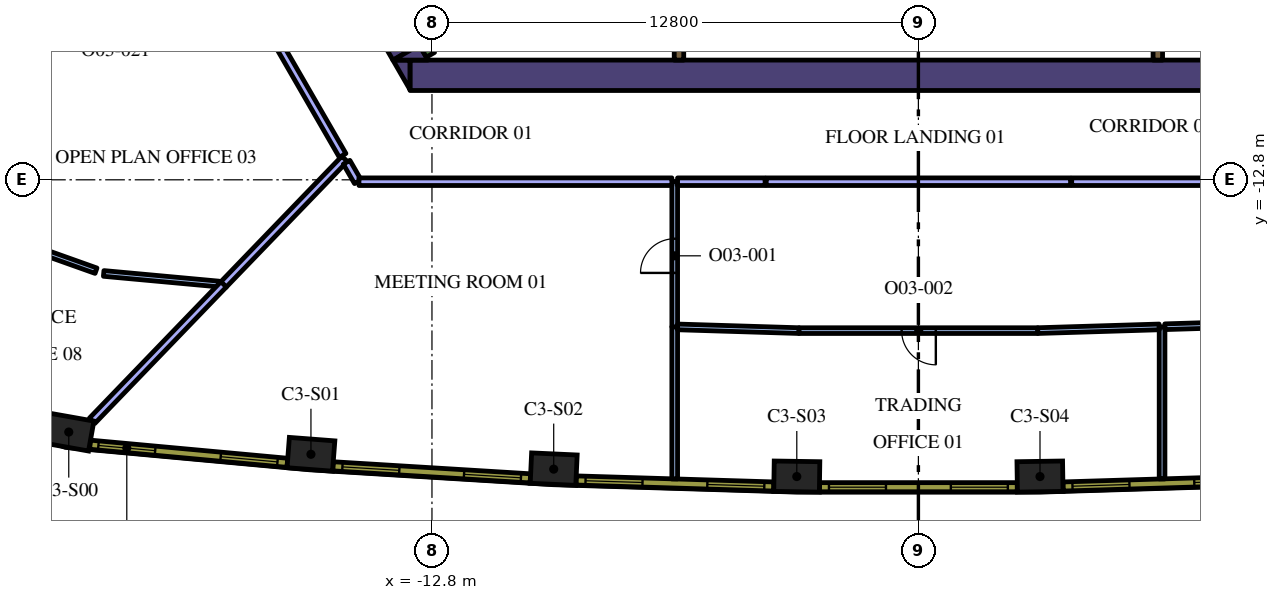
"""IFC4 building model, lengths in metres.
Left out: names, types, materials, properties, quantities, classifications, styles, units other than length and angle.
Written with IfcOpenShell. Run it as: python <this file> out.ifc"""

import sys

from ifc_helpers import new_model, si_unit, direction, frame, frame_2d, origin, origin_2d, place, context, subcontext, project, spatial, polyline, rectangle, outline, extrude, element, fill, save


model = new_model("IFC4")
c1 = context("Model", 3, precision=1e-05, world=origin(), true_north=direction((0.0, 1.0)))
c2 = subcontext(c1, "Body", "Model", "MODEL_VIEW")
j1 = project(units=[si_unit("LENGTHUNIT", "METRE"), si_unit("PLANEANGLEUNIT", "RADIAN")], contexts=[c1])
p1 = place(None, origin())
s1 = spatial("IfcSite", under=j1, at=p1, CompositionType="ELEMENT")
p2 = place(p1, origin())
s2 = spatial("IfcBuilding", under=s1, at=p2, CompositionType="ELEMENT")
p3 = place(p2, frame((0.0, 0.0, 175.2)))
s3 = spatial("IfcBuildingStorey", under=s2, at=p3, CompositionType="ELEMENT", Elevation=175.2)
for number, where, z_axis, x_axis in (
    (1, (-22.357, -19.437, 0.0), (0.0, 0.0, 1.0), (0.985, -0.175, 0.0)),
    (2, (-15.985, -20.022, 0.0), (0.0, 0.0, 1.0), (0.997, -0.076, 0.0)),
    (3, (-9.597, -20.413, 0.0), (0.0, 0.0, 1.0), (0.999, -0.046, 0.0)),
    (4, (-3.2, -20.608, 0.0), (0.0, 0.0, 1.0), (1.0, -0.015, 0.0)),
    (5, (3.2, -20.608, 0.0), (0.0, 0.0, 1.0), (1.0, 0.015, 0.0)),
):
    element("IfcColumn", number, at=place(p3, frame(where, z_axis=z_axis, x_axis=x_axis)), inside=s3, PredefinedType="COLUMN", context=c2, shape_type="SweptSolid", body=[
        extrude(rectangle(XDim=1.2, YDim=0.8, at=origin_2d()), origin(), (0.0, 0.0, 1.0), 4.2),
    ])
p4 = place(p3, frame((-13.378, -10.05, 0.0), z_axis=(0.0, 0.0, 1.0), x_axis=(1.0, 0.0, 0.0)))
e6 = element("IfcWall", 6, at=p4, inside=s3, PredefinedType="SOLIDWALL", context=c2, shape_type="SweptSolid", body=[
    extrude(rectangle(XDim=22.282, YDim=0.8, at=frame_2d((11.141, 0.0))), origin(), (0.0, 0.0, 1.0), 4.2),
])
p5 = place(p3, origin())
e7 = element("IfcWall", 7, at=p5, inside=s3, PredefinedType="SOLIDWALL", context=c2, shape_type="SweptSolid", body=[
    extrude(outline(polyline([(-13.828, -9.65), (-13.38, -9.65), (-13.38, -10.426), (-13.828, -9.65)])), origin(), (0.0, 0.0, 1.0), 4.2),
])
p6 = place(p3, frame((-15.392, -6.14, 0.0), z_axis=(0.0, 0.0, 1.0), x_axis=(0.499984020225, -0.866034629516, 0.0)))
e8 = element("IfcWall", 8, at=p6, inside=s3, PredefinedType="SOLIDWALL", context=c2, shape_type="SweptSolid", body=[
    extrude(rectangle(XDim=3.824, YDim=0.8, at=frame_2d((1.912, 0.0))), origin(), (0.0, 0.0, 1.0), 4.2),
])
e9 = element("IfcWall", 9, at=p5, inside=s3, PredefinedType="SOLIDWALL", context=c2, shape_type="SweptSolid", body=[
    extrude(outline(polyline([(-12.904, -9.65), (-13.82, -9.65), (-13.133, -9.253), (-12.904, -9.65)])), origin(), (0.0, 0.0, 1.0), 4.2),
])
p7 = place(p3, frame((-12.84, -9.511, 0.0), z_axis=(0.0, 0.0, 1.0), x_axis=(-0.499997733992, 0.866026712061, 0.0)))
e10 = element("IfcWall", 10, at=p7, inside=s3, PredefinedType="SOLIDWALL", context=c2, shape_type="SweptSolid", body=[
    extrude(rectangle(XDim=3.634, YDim=0.25, at=frame_2d((1.817, 0.0))), origin(), (0.0, 0.0, 1.0), 4.2),
])
p8 = place(p3, frame((-6.3, -8.925, 0.0), z_axis=(0.0, 0.0, 1.0), x_axis=(0.0, -1.0, 0.0)))
e11 = element("IfcWall", 11, at=p8, inside=s3, PredefinedType="SOLIDWALL", context=c2, shape_type="SweptSolid", body=[
    extrude(rectangle(XDim=0.725, YDim=0.25, at=frame_2d((0.363, 0.0))), origin(), (0.0, 0.0, 1.0), 4.2),
])
p9 = place(p3, frame((6.3, -9.65, 0.0), z_axis=(0.0, 0.0, 1.0), x_axis=(0.0, 1.0, 0.0)))
e12 = element("IfcWall", 12, at=p9, inside=s3, PredefinedType="SOLIDWALL", context=c2, shape_type="SweptSolid", body=[
    extrude(rectangle(XDim=1.008, YDim=0.25, at=frame_2d((0.504, 0.0))), origin(), (0.0, 0.0, 1.0), 4.2),
])
p10 = place(p3, frame((-6.412, -16.664, 0.0), z_axis=(0.0, 0.0, 1.0), x_axis=(0.0, -1.0, 0.0)))
e13 = element("IfcWall", 13, at=p10, inside=s3, PredefinedType="PARTITIONING", context=c2, shape_type="SweptSolid", body=[
    extrude(rectangle(XDim=4.006, YDim=0.15, at=frame_2d((2.003, 0.0))), origin(), (0.0, 0.0, 1.0), 3.15),
])
p11 = place(p3, frame((-6.412, -16.672, 0.0), z_axis=(0.0, 0.0, 1.0), x_axis=(0.0, 1.0, 0.0)))
e14 = element("IfcWall", 14, at=p11, inside=s3, PredefinedType="PARTITIONING", context=c2, shape_type="SweptSolid", body=[
    extrude(rectangle(XDim=3.822, YDim=0.15, at=frame_2d((1.911, 0.0))), origin(), (0.0, 0.0, 1.0), 3.15),
])
p12 = place(p11, frame((1.422, 0.0, 0.0)))
e15 = element("IfcOpeningElement", 15, at=p12, cuts=e14, PredefinedType="OPENING", context=c2, shape_type="SweptSolid", body=[
    extrude(rectangle(XDim=0.9, YDim=2.1, at=frame_2d((0.45, 1.05))), frame((0.0, 0.085, 0.0), z_axis=(0.0, -1.0, 0.0), x_axis=(1.0, 0.0, 0.0)), (0.0, 0.0, 1.0), 0.17),
])
p13 = place(p3, frame((-18.288, -15.557, 0.0), z_axis=(0.0, 0.0, 1.0), x_axis=(0.693944823318, 0.720028181525, 0.0)))
e16 = element("IfcWall", 16, at=p13, inside=s3, PredefinedType="PARTITIONING", context=c2, shape_type="SweptSolid", body=[
    extrude(rectangle(XDim=4.596, YDim=0.2, at=frame_2d((2.298, 0.0))), origin(), (0.0, 0.0, 1.0), 3.15),
])
p14 = place(p3, frame((-21.742, -19.14, 0.0), z_axis=(0.0, 0.0, 1.0), x_axis=(0.693986944276, 0.719987584042, 0.0)))
e17 = element("IfcWall", 17, at=p14, inside=s3, PredefinedType="PARTITIONING", context=c2, shape_type="SweptSolid", body=[
    extrude(rectangle(XDim=4.986, YDim=0.2, at=frame_2d((2.493, 0.0))), origin(), (0.0, 0.0, 1.0), 3.15),
])
p15 = place(p3, frame((-15.047, -12.338, 0.0), z_axis=(0.0, 0.0, 1.0), x_axis=(0.500091824179, -0.865972382579, 0.0)))
e18 = element("IfcWall", 18, at=p15, inside=s3, PredefinedType="PARTITIONING", context=c2, shape_type="SweptSolid", body=[
    extrude(rectangle(XDim=0.591, YDim=0.2, at=frame_2d((0.296, 0.0))), origin(), (0.0, 0.0, 1.0), 3.15),
])
p16 = place(p3, frame((-14.721, -12.85, 0.0), z_axis=(0.0, 0.0, 1.0), x_axis=(1.0, 0.0, 0.0)))
e19 = element("IfcWall", 19, at=p16, inside=s3, PredefinedType="PARTITIONING", context=c2, shape_type="SweptSolid", body=[
    extrude(rectangle(XDim=8.234, YDim=0.2, at=frame_2d((4.117, 0.0))), origin(), (0.0, 0.0, 1.0), 3.15),
])
p17 = place(p3, frame((6.412, -16.668, 0.0), z_axis=(0.0, 0.0, 1.0), x_axis=(0.0, -1.0, 0.0)))
e20 = element("IfcWall", 20, at=p17, inside=s3, PredefinedType="PARTITIONING", context=c2, shape_type="SweptSolid", body=[
    extrude(rectangle(XDim=4.002, YDim=0.15, at=frame_2d((2.001, 0.0))), origin(), (0.0, 0.0, 1.0), 3.15),
])
p18 = place(p3, frame((-6.337, -16.671, 0.0), z_axis=(0.0, 0.0, 1.0), x_axis=(0.999533369646, -0.030545751995, 0.0)))
e21 = element("IfcWall", 21, at=p18, inside=s3, PredefinedType="PARTITIONING", context=c2, shape_type="SweptSolid", body=[
    extrude(rectangle(XDim=3.197, YDim=0.15, at=frame_2d((1.599, 0.0))), origin(), (0.0, 0.0, 1.0), 3.15),
])
p19 = place(p3, frame((3.141, -16.768, 0.0), z_axis=(0.0, 0.0, 1.0), x_axis=(-1.0, 0.0, 0.0)))
e22 = element("IfcWall", 22, at=p19, inside=s3, PredefinedType="PARTITIONING", context=c2, shape_type="SweptSolid", body=[
    extrude(rectangle(XDim=6.283, YDim=0.15, at=frame_2d((3.141, 0.0))), origin(), (0.0, 0.0, 1.0), 3.15),
])
p20 = place(p19, frame((2.683, 0.0, 0.0)))
e23 = element("IfcOpeningElement", 23, at=p20, cuts=e22, PredefinedType="OPENING", context=c2, shape_type="SweptSolid", body=[
    extrude(rectangle(XDim=0.9, YDim=2.1, at=frame_2d((0.45, 1.05))), frame((0.0, 0.085, 0.0), z_axis=(0.0, -1.0, 0.0), x_axis=(1.0, 0.0, 0.0)), (0.0, 0.0, 1.0), 0.17),
])
p21 = place(p3, frame((3.141, -16.768, 0.0), z_axis=(0.0, 0.0, 1.0), x_axis=(0.999533369646, 0.030545751995, 0.0)))
e24 = element("IfcWall", 24, at=p21, inside=s3, PredefinedType="PARTITIONING", context=c2, shape_type="SweptSolid", body=[
    extrude(rectangle(XDim=3.197, YDim=0.15, at=frame_2d((1.599, 0.0))), origin(), (0.0, 0.0, 1.0), 3.15),
])
p22 = place(p3, frame((6.487, -16.666, 0.0), z_axis=(0.0, 0.0, 1.0), x_axis=(0.999533978083, 0.030525835896, 0.0)))
e25 = element("IfcWall", 25, at=p22, inside=s3, PredefinedType="PARTITIONING", context=c2, shape_type="SweptSolid", body=[
    extrude(rectangle(XDim=2.935, YDim=0.15, at=frame_2d((1.468, 0.0))), origin(), (0.0, 0.0, 1.0), 3.15),
])
p23 = place(p3, frame((-4.004, -12.85, 0.0), z_axis=(0.0, 0.0, 1.0), x_axis=(1.0, 0.0, 0.0)))
e26 = element("IfcWall", 26, at=p23, inside=s3, PredefinedType="PARTITIONING", context=c2, shape_type="SweptSolid", body=[
    extrude(rectangle(XDim=8.008, YDim=0.2, at=frame_2d((4.004, 0.0))), origin(), (0.0, 0.0, 1.0), 3.15),
])
p24 = place(p3, frame((-6.337, -12.85, 0.0), z_axis=(0.0, 0.0, 1.0), x_axis=(1.0, 0.0, 0.0)))
e27 = element("IfcWall", 27, at=p24, inside=s3, PredefinedType="PARTITIONING", context=c2, shape_type="SweptSolid", body=[
    extrude(rectangle(XDim=2.303, YDim=0.2, at=frame_2d((1.151, 0.0))), origin(), (0.0, 0.0, 1.0), 3.15),
])
p25 = place(p3, frame((4.034, -12.85, 0.0), z_axis=(0.0, 0.0, 1.0), x_axis=(1.0, 0.0, 0.0)))
e28 = element("IfcWall", 28, at=p25, inside=s3, PredefinedType="PARTITIONING", context=c2, shape_type="SweptSolid", body=[
    extrude(rectangle(XDim=10.717, YDim=0.2, at=frame_2d((5.359, 0.0))), origin(), (0.0, 0.0, 1.0), 3.15),
])
p26 = place(p25, frame((4.9, 0.0, 0.0)))
e29 = element("IfcOpeningElement", 29, at=p26, cuts=e28, PredefinedType="OPENING", context=c2, shape_type="SweptSolid", body=[
    extrude(rectangle(XDim=1.0, YDim=2.1, at=frame_2d((0.5, 1.05))), frame((0.0, 0.11, 0.0), z_axis=(0.0, -1.0, 0.0), x_axis=(1.0, 0.0, 0.0)), (0.0, 0.0, 1.0), 0.22),
])
p27 = place(p3, frame((-18.412, -15.542, 0.0), z_axis=(0.0, 0.0, 1.0), x_axis=(-0.995812481052, 0.091419377496, 0.0)))
e30 = element("IfcWall", 30, at=p27, inside=s3, PredefinedType="PARTITIONING", context=c2, shape_type="SweptSolid", body=[
    extrude(rectangle(XDim=3.039, YDim=0.15, at=frame_2d((1.52, 0.0))), origin(), (0.0, 0.0, 1.0), 3.15),
])
p28 = place(p3, frame((-21.64, -15.192, 0.0), z_axis=(0.0, 0.0, 1.0), x_axis=(-0.942099140138, 0.335334475041, 0.0)))
e31 = element("IfcWall", 31, at=p28, inside=s3, PredefinedType="PARTITIONING", context=c2, shape_type="SweptSolid", body=[
    extrude(rectangle(XDim=1.498, YDim=0.15, at=frame_2d((0.749, 0.0))), origin(), (0.0, 0.0, 1.0), 3.15),
])
p29 = place(p3, frame((-23.848, -10.74, 0.0), z_axis=(0.0, 0.0, 1.0), x_axis=(0.418723219841, 0.908113905392, 0.0)))
e32 = element("IfcWall", 32, at=p29, inside=s3, PredefinedType="PARTITIONING", context=c2, shape_type="SweptSolid", body=[
    extrude(rectangle(XDim=4.623, YDim=0.15, at=frame_2d((2.311, 0.0))), origin(), (0.0, 0.0, 1.0), 3.15),
])
p30 = place(p29, frame((1.9, 0.0, 0.0)))
e33 = element("IfcOpeningElement", 33, at=p30, cuts=e32, PredefinedType="OPENING", context=c2, shape_type="SweptSolid", body=[
    extrude(rectangle(XDim=0.9, YDim=2.1, at=frame_2d((0.45, 1.05))), frame((0.0, 0.085, 0.0), z_axis=(0.0, -1.0, 0.0), x_axis=(1.0, 0.0, 0.0)), (0.0, 0.0, 1.0), 0.17),
])
p31 = place(p3, frame((-18.489, -6.376, 0.0), z_axis=(0.0, 0.0, 1.0), x_axis=(0.499989401968, -0.866031522475, 0.0)))
e34 = element("IfcWall", 34, at=p31, inside=s3, PredefinedType="PARTITIONING", context=c2, shape_type="SweptSolid", body=[
    extrude(rectangle(XDim=6.677, YDim=0.2, at=frame_2d((3.338, 0.0))), origin(), (0.0, 0.0, 1.0), 3.15),
])
p32 = place(p3, frame((-21.797, -19.77, 0.0), z_axis=(0.0, 0.0, 1.0), x_axis=(0.995808712151, -0.091460422067, 0.0)))
e35 = element("IfcWall", 35, at=p32, inside=s3, PredefinedType="SOLIDWALL", context=c2, shape_type="SweptSolid", body=[
    extrude(rectangle(XDim=5.213, YDim=0.24, at=frame_2d((2.606, 0.0))), origin(), (0.0, 0.0, 1.0), 3.95),
])
p33 = place(p32, frame((0.221, 0.0, 0.9)))
e36 = element("IfcOpeningElement", 36, at=p33, cuts=e35, PredefinedType="OPENING", context=c2, shape_type="SweptSolid", body=[
    extrude(rectangle(XDim=1.5, YDim=2.55, at=frame_2d((0.75, 1.275))), frame((0.0, 0.13, 0.0), z_axis=(0.0, -1.0, 0.0), x_axis=(1.0, 0.0, 0.0)), (0.0, 0.0, 1.0), 0.26),
])
p34 = place(p32, frame((3.452, 0.0, 0.9)))
e37 = element("IfcOpeningElement", 37, at=p34, cuts=e35, PredefinedType="OPENING", context=c2, shape_type="SweptSolid", body=[
    extrude(rectangle(XDim=1.5, YDim=2.55, at=frame_2d((0.75, 1.275))), frame((0.0, 0.13, 0.0), z_axis=(0.0, -1.0, 0.0), x_axis=(1.0, 0.0, 0.0)), (0.0, 0.0, 1.0), 0.26),
])
p35 = place(p3, frame((-15.405, -20.338, 0.0), z_axis=(0.0, 0.0, 1.0), x_axis=(0.998135294646, -0.061040425794, 0.0)))
e38 = element("IfcWall", 38, at=p35, inside=s3, PredefinedType="SOLIDWALL", context=c2, shape_type="SweptSolid", body=[
    extrude(rectangle(XDim=5.204, YDim=0.24, at=frame_2d((2.602, 0.0))), origin(), (0.0, 0.0, 1.0), 3.95),
])
p36 = place(p35, frame((0.248, 0.0, 0.9)))
e39 = element("IfcOpeningElement", 39, at=p36, cuts=e38, PredefinedType="OPENING", context=c2, shape_type="SweptSolid", body=[
    extrude(rectangle(XDim=1.5, YDim=2.55, at=frame_2d((0.75, 1.275))), frame((0.0, 0.13, 0.0), z_axis=(0.0, -1.0, 0.0), x_axis=(1.0, 0.0, 0.0)), (0.0, 0.0, 1.0), 0.26),
])
p37 = place(p35, frame((3.455, 0.0, 0.9)))
e40 = element("IfcOpeningElement", 40, at=p37, cuts=e38, PredefinedType="OPENING", context=c2, shape_type="SweptSolid", body=[
    extrude(rectangle(XDim=1.5, YDim=2.55, at=frame_2d((0.75, 1.275))), frame((0.0, 0.13, 0.0), z_axis=(0.0, -1.0, 0.0), x_axis=(1.0, 0.0, 0.0)), (0.0, 0.0, 1.0), 0.26),
])
p38 = place(p3, frame((-9.007, -20.711, 0.0), z_axis=(0.0, 0.0, 1.0), x_axis=(0.999533441983, -0.030543384845, 0.0)))
e41 = element("IfcWall", 41, at=p38, inside=s3, PredefinedType="SOLIDWALL", context=c2, shape_type="SweptSolid", body=[
    extrude(rectangle(XDim=5.204, YDim=0.24, at=frame_2d((2.602, 0.0))), origin(), (0.0, 0.0, 1.0), 3.95),
])
p39 = place(p38, frame((0.248, 0.0, 0.9)))
e42 = element("IfcOpeningElement", 42, at=p39, cuts=e41, PredefinedType="OPENING", context=c2, shape_type="SweptSolid", body=[
    extrude(rectangle(XDim=1.5, YDim=2.55, at=frame_2d((0.75, 1.275))), frame((0.0, 0.13, 0.0), z_axis=(0.0, -1.0, 0.0), x_axis=(1.0, 0.0, 0.0)), (0.0, 0.0, 1.0), 0.26),
])
p40 = place(p38, frame((3.455, 0.0, 0.9)))
e43 = element("IfcOpeningElement", 43, at=p40, cuts=e41, PredefinedType="OPENING", context=c2, shape_type="SweptSolid", body=[
    extrude(rectangle(XDim=1.5, YDim=2.55, at=frame_2d((0.75, 1.275))), frame((0.0, 0.13, 0.0), z_axis=(0.0, -1.0, 0.0), x_axis=(1.0, 0.0, 0.0)), (0.0, 0.0, 1.0), 0.26),
])
p41 = place(p3, frame((-2.602, -20.888, 0.0), z_axis=(0.0, 0.0, 1.0), x_axis=(1.0, 0.0, 0.0)))
e44 = element("IfcWall", 44, at=p41, inside=s3, PredefinedType="SOLIDWALL", context=c2, shape_type="SweptSolid", body=[
    extrude(rectangle(XDim=5.204, YDim=0.24, at=frame_2d((2.602, 0.0))), origin(), (0.0, 0.0, 1.0), 3.95),
])
p42 = place(p41, frame((0.248, 0.0, 0.9)))
e45 = element("IfcOpeningElement", 45, at=p42, cuts=e44, PredefinedType="OPENING", context=c2, shape_type="SweptSolid", body=[
    extrude(rectangle(XDim=1.5, YDim=2.55, at=frame_2d((0.75, 1.275))), frame((0.0, 0.13, 0.0), z_axis=(0.0, -1.0, 0.0), x_axis=(1.0, 0.0, 0.0)), (0.0, 0.0, 1.0), 0.26),
])
p43 = place(p41, frame((3.455, 0.0, 0.9)))
e46 = element("IfcOpeningElement", 46, at=p43, cuts=e44, PredefinedType="OPENING", context=c2, shape_type="SweptSolid", body=[
    extrude(rectangle(XDim=1.5, YDim=2.55, at=frame_2d((0.75, 1.275))), frame((0.0, 0.13, 0.0), z_axis=(0.0, -1.0, 0.0), x_axis=(1.0, 0.0, 0.0)), (0.0, 0.0, 1.0), 0.26),
])
p44 = place(p3, frame((3.806, -20.87, 0.0), z_axis=(0.0, 0.0, 1.0), x_axis=(0.999533441983, 0.030543384845, 0.0)))
e47 = element("IfcWall", 47, at=p44, inside=s3, PredefinedType="SOLIDWALL", context=c2, shape_type="SweptSolid", body=[
    extrude(rectangle(XDim=5.204, YDim=0.24, at=frame_2d((2.602, 0.0))), origin(), (0.0, 0.0, 1.0), 3.95),
])
p45 = place(p44, frame((0.248, 0.0, 0.9)))
e48 = element("IfcOpeningElement", 48, at=p45, cuts=e47, PredefinedType="OPENING", context=c2, shape_type="SweptSolid", body=[
    extrude(rectangle(XDim=1.5, YDim=2.55, at=frame_2d((0.75, 1.275))), frame((0.0, 0.13, 0.0), z_axis=(0.0, -1.0, 0.0), x_axis=(1.0, 0.0, 0.0)), (0.0, 0.0, 1.0), 0.26),
])
p46 = place(p44, frame((3.455, 0.0, 0.9)))
e49 = element("IfcOpeningElement", 49, at=p46, cuts=e47, PredefinedType="OPENING", context=c2, shape_type="SweptSolid", body=[
    extrude(rectangle(XDim=1.5, YDim=2.55, at=frame_2d((0.75, 1.275))), frame((0.0, 0.13, 0.0), z_axis=(0.0, -1.0, 0.0), x_axis=(1.0, 0.0, 0.0)), (0.0, 0.0, 1.0), 0.26),
])
p47 = place(p12, origin())
e50 = element("IfcDoor", 50, at=p47, inside=s3, OperationType="SINGLE_SWING_LEFT", PredefinedType="DOOR", context=c2, shape_type="SweptSolid", body=[
    extrude(rectangle(XDim=0.9, YDim=2.1, at=frame_2d((0.45, 1.05))), frame((0.0, 0.025, 0.0), z_axis=(0.0, -1.0, 0.0), x_axis=(1.0, 0.0, 0.0)), (0.0, 0.0, 1.0), 0.05),
])
fill(e15, e50)
p48 = place(p20, origin())
e51 = element("IfcDoor", 51, at=p48, inside=s3, OperationType="SINGLE_SWING_LEFT", PredefinedType="DOOR", context=c2, shape_type="SweptSolid", body=[
    extrude(rectangle(XDim=0.9, YDim=2.1, at=frame_2d((0.45, 1.05))), frame((0.0, 0.025, 0.0), z_axis=(0.0, -1.0, 0.0), x_axis=(1.0, 0.0, 0.0)), (0.0, 0.0, 1.0), 0.05),
])
fill(e23, e51)
p49 = place(p33, origin())
e52 = element("IfcWindow", 52, at=p49, inside=s3, PartitioningType="SINGLE_PANEL", PredefinedType="WINDOW", context=c2, shape_type="SweptSolid", body=[
    extrude(rectangle(XDim=1.5, YDim=2.55, at=frame_2d((0.75, 1.275))), frame((0.0, 0.04, 0.0), z_axis=(0.0, -1.0, 0.0), x_axis=(1.0, 0.0, 0.0)), (0.0, 0.0, 1.0), 0.06),
])
fill(e36, e52)
p50 = place(p34, origin())
e53 = element("IfcWindow", 53, at=p50, inside=s3, PartitioningType="SINGLE_PANEL", PredefinedType="WINDOW", context=c2, shape_type="SweptSolid", body=[
    extrude(rectangle(XDim=1.5, YDim=2.55, at=frame_2d((0.75, 1.275))), frame((0.0, 0.04, 0.0), z_axis=(0.0, -1.0, 0.0), x_axis=(1.0, 0.0, 0.0)), (0.0, 0.0, 1.0), 0.06),
])
fill(e37, e53)
p51 = place(p36, origin())
e54 = element("IfcWindow", 54, at=p51, inside=s3, PartitioningType="SINGLE_PANEL", PredefinedType="WINDOW", context=c2, shape_type="SweptSolid", body=[
    extrude(rectangle(XDim=1.5, YDim=2.55, at=frame_2d((0.75, 1.275))), frame((0.0, 0.04, 0.0), z_axis=(0.0, -1.0, 0.0), x_axis=(1.0, 0.0, 0.0)), (0.0, 0.0, 1.0), 0.06),
])
fill(e39, e54)
p52 = place(p37, origin())
e55 = element("IfcWindow", 55, at=p52, inside=s3, PartitioningType="SINGLE_PANEL", PredefinedType="WINDOW", context=c2, shape_type="SweptSolid", body=[
    extrude(rectangle(XDim=1.5, YDim=2.55, at=frame_2d((0.75, 1.275))), frame((0.0, 0.04, 0.0), z_axis=(0.0, -1.0, 0.0), x_axis=(1.0, 0.0, 0.0)), (0.0, 0.0, 1.0), 0.06),
])
fill(e40, e55)
p53 = place(p39, origin())
e56 = element("IfcWindow", 56, at=p53, inside=s3, PartitioningType="SINGLE_PANEL", PredefinedType="WINDOW", context=c2, shape_type="SweptSolid", body=[
    extrude(rectangle(XDim=1.5, YDim=2.55, at=frame_2d((0.75, 1.275))), frame((0.0, 0.04, 0.0), z_axis=(0.0, -1.0, 0.0), x_axis=(1.0, 0.0, 0.0)), (0.0, 0.0, 1.0), 0.06),
])
fill(e42, e56)
p54 = place(p40, origin())
e57 = element("IfcWindow", 57, at=p54, inside=s3, PartitioningType="SINGLE_PANEL", PredefinedType="WINDOW", context=c2, shape_type="SweptSolid", body=[
    extrude(rectangle(XDim=1.5, YDim=2.55, at=frame_2d((0.75, 1.275))), frame((0.0, 0.04, 0.0), z_axis=(0.0, -1.0, 0.0), x_axis=(1.0, 0.0, 0.0)), (0.0, 0.0, 1.0), 0.06),
])
fill(e43, e57)
p55 = place(p42, origin())
e58 = element("IfcWindow", 58, at=p55, inside=s3, PartitioningType="SINGLE_PANEL", PredefinedType="WINDOW", context=c2, shape_type="SweptSolid", body=[
    extrude(rectangle(XDim=1.5, YDim=2.55, at=frame_2d((0.75, 1.275))), frame((0.0, 0.04, 0.0), z_axis=(0.0, -1.0, 0.0), x_axis=(1.0, 0.0, 0.0)), (0.0, 0.0, 1.0), 0.06),
])
fill(e45, e58)
p56 = place(p43, origin())
e59 = element("IfcWindow", 59, at=p56, inside=s3, PartitioningType="SINGLE_PANEL", PredefinedType="WINDOW", context=c2, shape_type="SweptSolid", body=[
    extrude(rectangle(XDim=1.5, YDim=2.55, at=frame_2d((0.75, 1.275))), frame((0.0, 0.04, 0.0), z_axis=(0.0, -1.0, 0.0), x_axis=(1.0, 0.0, 0.0)), (0.0, 0.0, 1.0), 0.06),
])
fill(e46, e59)
p57 = place(p45, origin())
e60 = element("IfcWindow", 60, at=p57, inside=s3, PartitioningType="SINGLE_PANEL", PredefinedType="WINDOW", context=c2, shape_type="SweptSolid", body=[
    extrude(rectangle(XDim=1.5, YDim=2.55, at=frame_2d((0.75, 1.275))), frame((0.0, 0.04, 0.0), z_axis=(0.0, -1.0, 0.0), x_axis=(1.0, 0.0, 0.0)), (0.0, 0.0, 1.0), 0.06),
])
fill(e48, e60)
p58 = place(p46, origin())
e61 = element("IfcWindow", 61, at=p58, inside=s3, PartitioningType="SINGLE_PANEL", PredefinedType="WINDOW", context=c2, shape_type="SweptSolid", body=[
    extrude(rectangle(XDim=1.5, YDim=2.55, at=frame_2d((0.75, 1.275))), frame((0.0, 0.04, 0.0), z_axis=(0.0, -1.0, 0.0), x_axis=(1.0, 0.0, 0.0)), (0.0, 0.0, 1.0), 0.06),
])
fill(e49, e61)
save(model, sys.argv[1])
